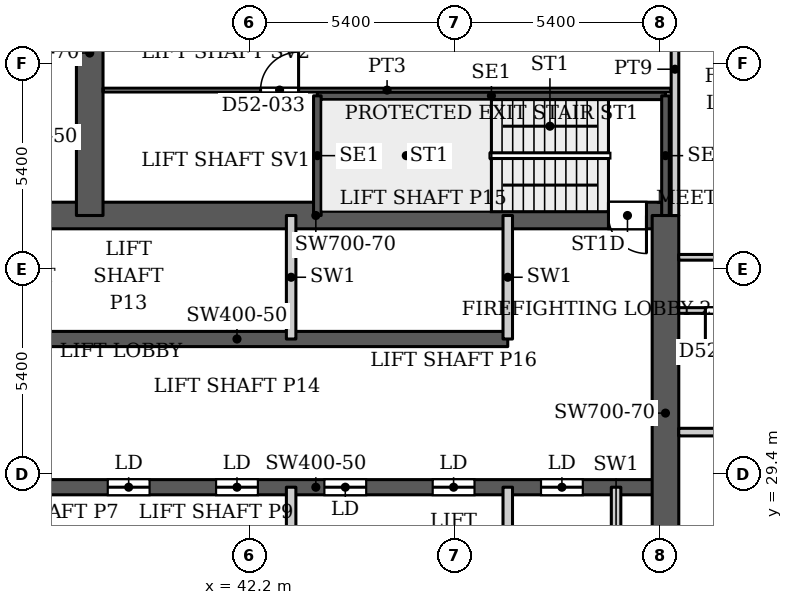
"""IFC4 building model, lengths in metres.
Left out: names, types, materials, properties, quantities, classifications, styles, units other than length and angle.
Written with IfcOpenShell. Run it as: python <this file> out.ifc"""

import sys

from ifc_helpers import new_model, si_unit, direction, frame, frame_2d, origin, place, context, subcontext, project, spatial, rectangle, extrude, source, transform, mapped, element, fill, save


model = new_model("IFC4")
c1 = context("Model", 3, precision=1e-05, world=origin(), true_north=direction((0.0, 1.0)))
c2 = subcontext(c1, "Body", "Model", "MODEL_VIEW")
j1 = project(units=[si_unit("LENGTHUNIT", "METRE"), si_unit("PLANEANGLEUNIT", "RADIAN")], contexts=[c1])
p1 = place(None, origin())
s1 = spatial("IfcSite", under=j1, at=p1, CompositionType="ELEMENT")
p2 = place(p1, origin())
s2 = spatial("IfcBuilding", under=s1, at=p2, CompositionType="ELEMENT")
p3 = place(p2, frame((0.0, 0.0, 224.0)))
s3 = spatial("IfcBuildingStorey", under=s2, at=p3, CompositionType="ELEMENT", Elevation=224.0)
p4 = place(p3, frame((34.75, 29.05, 0.0), z_axis=(0.0, 0.0, 1.0), x_axis=(1.0, 0.0, 0.0)))
e1 = element("IfcWall", 1, at=p4, inside=s3, PredefinedType="SHEAR", context=c2, shape_type="SweptSolid", body=[
    extrude(rectangle(XDim=18.4, YDim=0.4, at=frame_2d((9.2, 0.0))), origin(), (0.0, 0.0, 1.0), 3.9),
])
p5 = place(p4, frame((0.875, 0.0, 0.0)))
e2 = element("IfcOpeningElement", 2, at=p5, cuts=e1, PredefinedType="OPENING", context=c2, shape_type="SweptSolid", body=[
    extrude(rectangle(XDim=1.1, YDim=2.2, at=frame_2d((0.55, 1.1))), frame((0.0, 0.21, 0.0), z_axis=(0.0, -1.0, 0.0), x_axis=(1.0, 0.0, 0.0)), (0.0, 0.0, 1.0), 0.42),
])
p6 = place(p4, frame((3.725, 0.0, 0.0)))
e3 = element("IfcOpeningElement", 3, at=p6, cuts=e1, PredefinedType="OPENING", context=c2, shape_type="SweptSolid", body=[
    extrude(rectangle(XDim=1.1, YDim=2.2, at=frame_2d((0.55, 1.1))), frame((0.0, 0.21, 0.0), z_axis=(0.0, -1.0, 0.0), x_axis=(1.0, 0.0, 0.0)), (0.0, 0.0, 1.0), 0.42),
])
p7 = place(p4, frame((6.575, 0.0, 0.0)))
e4 = element("IfcOpeningElement", 4, at=p7, cuts=e1, PredefinedType="OPENING", context=c2, shape_type="SweptSolid", body=[
    extrude(rectangle(XDim=1.1, YDim=2.2, at=frame_2d((0.55, 1.1))), frame((0.0, 0.21, 0.0), z_axis=(0.0, -1.0, 0.0), x_axis=(1.0, 0.0, 0.0)), (0.0, 0.0, 1.0), 0.42),
])
p8 = place(p4, frame((9.425, 0.0, 0.0)))
e5 = element("IfcOpeningElement", 5, at=p8, cuts=e1, PredefinedType="OPENING", context=c2, shape_type="SweptSolid", body=[
    extrude(rectangle(XDim=1.1, YDim=2.2, at=frame_2d((0.55, 1.1))), frame((0.0, 0.21, 0.0), z_axis=(0.0, -1.0, 0.0), x_axis=(1.0, 0.0, 0.0)), (0.0, 0.0, 1.0), 0.42),
])
p9 = place(p4, frame((12.275, 0.0, 0.0)))
e6 = element("IfcOpeningElement", 6, at=p9, cuts=e1, PredefinedType="OPENING", context=c2, shape_type="SweptSolid", body=[
    extrude(rectangle(XDim=1.1, YDim=2.2, at=frame_2d((0.55, 1.1))), frame((0.0, 0.21, 0.0), z_axis=(0.0, -1.0, 0.0), x_axis=(1.0, 0.0, 0.0)), (0.0, 0.0, 1.0), 0.42),
])
p10 = place(p4, frame((15.125, 0.0, 0.0)))
e7 = element("IfcOpeningElement", 7, at=p10, cuts=e1, PredefinedType="OPENING", context=c2, shape_type="SweptSolid", body=[
    extrude(rectangle(XDim=1.1, YDim=2.2, at=frame_2d((0.55, 1.1))), frame((0.0, 0.21, 0.0), z_axis=(0.0, -1.0, 0.0), x_axis=(1.0, 0.0, 0.0)), (0.0, 0.0, 1.0), 0.42),
])
p11 = place(p3, frame((34.75, 32.95, 0.0), z_axis=(0.0, 0.0, 1.0), x_axis=(1.0, 0.0, 0.0)))
e8 = element("IfcWall", 8, at=p11, inside=s3, PredefinedType="SHEAR", context=c2, shape_type="SweptSolid", body=[
    extrude(rectangle(XDim=14.25, YDim=0.4, at=frame_2d((7.125, 0.0))), origin(), (0.0, 0.0, 1.0), 3.9),
])
p12 = place(p3, frame((34.75, 36.2, 0.0), z_axis=(0.0, 0.0, 1.0), x_axis=(1.0, 0.0, 0.0)))
e9 = element("IfcWall", 9, at=p12, inside=s3, PredefinedType="SHEAR", context=c2, shape_type="SweptSolid", body=[
    extrude(rectangle(XDim=18.4, YDim=0.7, at=frame_2d((9.2, 0.0))), origin(), (0.0, 0.0, 1.0), 3.9),
])
p13 = place(p12, frame((16.9, 0.0, 0.0)))
e10 = element("IfcOpeningElement", 10, at=p13, cuts=e9, PredefinedType="OPENING", context=c2, shape_type="SweptSolid", body=[
    extrude(rectangle(XDim=1.0, YDim=2.2, at=frame_2d((0.5, 1.1))), frame((0.0, 0.36, 0.0), z_axis=(0.0, -1.0, 0.0), x_axis=(1.0, 0.0, 0.0)), (0.0, 0.0, 1.0), 0.72),
])
p14 = place(p3, frame((38.0, 36.2, 0.0), z_axis=(0.0, 0.0, 1.0), x_axis=(0.0, 1.0, 0.0)))
e11 = element("IfcWall", 11, at=p14, inside=s3, PredefinedType="SHEAR", context=c2, shape_type="SweptSolid", body=[
    extrude(rectangle(XDim=8.55, YDim=0.7, at=frame_2d((4.275, 0.0))), origin(), (0.0, 0.0, 1.0), 3.9),
])
p15 = place(p3, frame((53.15, 25.8, 0.0), z_axis=(0.0, 0.0, 1.0), x_axis=(0.0, 1.0, 0.0)))
e12 = element("IfcWall", 12, at=p15, inside=s3, PredefinedType="SHEAR", context=c2, shape_type="SweptSolid", body=[
    extrude(rectangle(XDim=10.4, YDim=0.7, at=frame_2d((5.2, 0.0))), origin(), (0.0, 0.0, 1.0), 3.9),
])
p16 = place(p3, frame((43.99, 39.35, 0.0), z_axis=(0.0, 0.0, 1.0), x_axis=(1.0, 0.0, 0.0)))
e13 = element("IfcWall", 13, at=p16, inside=s3, PredefinedType="SHEAR", context=c2, shape_type="SweptSolid", body=[
    extrude(rectangle(XDim=9.16, YDim=0.2, at=frame_2d((4.58, 0.0))), origin(), (0.0, 0.0, 1.0), 3.9),
])
for number, where, z_axis, x_axis in (
    (14, (43.99, 36.2, 0.0), (0.0, 0.0, 1.0), (0.0, 1.0, 0.0)),
    (15, (53.15, 36.2, 0.0), (0.0, 0.0, 1.0), (0.0, 1.0, 0.0)),
):
    element("IfcWall", number, at=place(p3, frame(where, z_axis=z_axis, x_axis=x_axis)), inside=s3, PredefinedType="SHEAR", context=c2, shape_type="SweptSolid", body=[
        extrude(rectangle(XDim=3.15, YDim=0.2, at=frame_2d((1.575, 0.0))), origin(), (0.0, 0.0, 1.0), 3.9),
    ])
for number, where, z_axis, x_axis in (
    (16, (43.3, 25.8, 0.0), (0.0, 0.0, 1.0), (0.0, 1.0, 0.0)),
    (17, (43.3, 32.95, 0.0), (0.0, 0.0, 1.0), (0.0, 1.0, 0.0)),
    (18, (49.0, 25.8, 0.0), (0.0, 0.0, 1.0), (0.0, 1.0, 0.0)),
    (19, (49.0, 32.95, 0.0), (0.0, 0.0, 1.0), (0.0, 1.0, 0.0)),
    (20, (51.85, 25.8, 0.0), (0.0, 0.0, 1.0), (0.0, 1.0, 0.0)),
):
    element("IfcWall", number, at=place(p3, frame(where, z_axis=z_axis, x_axis=x_axis)), inside=s3, PredefinedType="PARTITIONING", context=c2, shape_type="SweptSolid", body=[
        extrude(rectangle(XDim=3.25, YDim=0.25, at=frame_2d((1.625, 0.0))), origin(), (0.0, 0.0, 1.0), 3.9),
    ])
p17 = place(p3, frame((38.349, 39.5, 0.0), z_axis=(0.0, 0.0, 1.0), x_axis=(1.0, 0.0, 0.0)))
e21 = element("IfcWall", 21, at=p17, inside=s3, PredefinedType="PARTITIONING", context=c2, shape_type="SweptSolid", body=[
    extrude(rectangle(XDim=14.951, YDim=0.1, at=frame_2d((7.476, 0.0))), origin(), (0.0, 0.0, 1.0), 3.6),
])
p18 = place(p17, frame((4.147, 0.0, 0.0)))
e22 = element("IfcOpeningElement", 22, at=p18, cuts=e21, PredefinedType="OPENING", context=c2, shape_type="SweptSolid", body=[
    extrude(rectangle(XDim=1.0, YDim=2.1, at=frame_2d((0.5, 1.05))), frame((0.0, 0.06, 0.0), z_axis=(0.0, -1.0, 0.0), x_axis=(1.0, 0.0, 0.0)), (0.0, 0.0, 1.0), 0.12),
])
p19 = place(p3, frame((53.4, 36.199, 0.0), z_axis=(0.0, 0.0, 1.0), x_axis=(0.0, 1.0, 0.0)))
e23 = element("IfcWall", 23, at=p19, inside=s3, PredefinedType="PARTITIONING", context=c2, shape_type="SweptSolid", body=[
    extrude(rectangle(XDim=7.701, YDim=0.2, at=frame_2d((3.851, 0.0))), origin(), (0.0, 0.0, 1.0), 3.6),
])
p20 = place(p3, frame((53.499, 30.5, 0.0), z_axis=(0.0, 0.0, 1.0), x_axis=(1.0, 0.0, 0.0)))
e24 = element("IfcWall", 24, at=p20, inside=s3, PredefinedType="PARTITIONING", context=c2, shape_type="SweptSolid", body=[
    extrude(rectangle(XDim=28.401, YDim=0.2, at=frame_2d((14.2, 0.0))), origin(), (0.0, 0.0, 1.0), 3.6),
])
p21 = place(p20, frame((17.701, 0.0, 0.0)))
e25 = element("IfcOpeningElement", 25, at=p21, cuts=e24, PredefinedType="OPENING", context=c2, shape_type="SweptSolid", body=[
    extrude(rectangle(XDim=1.0, YDim=2.1, at=frame_2d((0.5, 1.05))), frame((0.0, 0.11, 0.0), z_axis=(0.0, -1.0, 0.0), x_axis=(1.0, 0.0, 0.0)), (0.0, 0.0, 1.0), 0.22),
])
p22 = place(p20, frame((24.301, 0.0, 0.0)))
e26 = element("IfcOpeningElement", 26, at=p22, cuts=e24, PredefinedType="OPENING", context=c2, shape_type="SweptSolid", body=[
    extrude(rectangle(XDim=1.0, YDim=2.1, at=frame_2d((0.5, 1.05))), frame((0.0, 0.11, 0.0), z_axis=(0.0, -1.0, 0.0), x_axis=(1.0, 0.0, 0.0)), (0.0, 0.0, 1.0), 0.22),
])
p23 = place(p3, frame((53.499, 33.7, 0.0), z_axis=(0.0, 0.0, 1.0), x_axis=(1.0, 0.0, 0.0)))
e27 = element("IfcWall", 27, at=p23, inside=s3, PredefinedType="PARTITIONING", context=c2, shape_type="SweptSolid", body=[
    extrude(rectangle(XDim=17.076, YDim=0.15, at=frame_2d((8.538, 0.0))), origin(), (0.0, 0.0, 1.0), 3.6),
])
p24 = place(p23, frame((10.151, 0.0, 0.0)))
e28 = element("IfcOpeningElement", 28, at=p24, cuts=e27, PredefinedType="OPENING", context=c2, shape_type="SweptSolid", body=[
    extrude(rectangle(XDim=0.8, YDim=2.1, at=frame_2d((0.4, 1.05))), frame((0.0, 0.085, 0.0), z_axis=(0.0, -1.0, 0.0), x_axis=(1.0, 0.0, 0.0)), (0.0, 0.0, 1.0), 0.17),
])
p25 = place(p23, frame((14.651, 0.0, 0.0)))
e29 = element("IfcOpeningElement", 29, at=p25, cuts=e27, PredefinedType="OPENING", context=c2, shape_type="SweptSolid", body=[
    extrude(rectangle(XDim=0.8, YDim=2.1, at=frame_2d((0.4, 1.05))), frame((0.0, 0.085, 0.0), z_axis=(0.0, -1.0, 0.0), x_axis=(1.0, 0.0, 0.0)), (0.0, 0.0, 1.0), 0.17),
])
p26 = place(p23, frame((7.451, 0.0, 0.0)))
e30 = element("IfcOpeningElement", 30, at=p26, cuts=e27, PredefinedType="OPENING", context=c2, shape_type="SweptSolid", body=[
    extrude(rectangle(XDim=0.8, YDim=2.1, at=frame_2d((0.4, 1.05))), frame((0.0, 0.085, 0.0), z_axis=(0.0, -1.0, 0.0), x_axis=(1.0, 0.0, 0.0)), (0.0, 0.0, 1.0), 0.17),
])
p27 = place(p23, frame((3.851, 0.0, 0.0)))
e31 = element("IfcOpeningElement", 31, at=p27, cuts=e27, PredefinedType="OPENING", context=c2, shape_type="SweptSolid", body=[
    extrude(rectangle(XDim=0.9, YDim=2.1, at=frame_2d((0.45, 1.05))), frame((0.0, 0.085, 0.0), z_axis=(0.0, -1.0, 0.0), x_axis=(1.0, 0.0, 0.0)), (0.0, 0.0, 1.0), 0.17),
])
p28 = place(p23, frame((0.701, 0.0, 0.0)))
e32 = element("IfcOpeningElement", 32, at=p28, cuts=e27, PredefinedType="OPENING", context=c2, shape_type="SweptSolid", body=[
    extrude(rectangle(XDim=0.8, YDim=2.1, at=frame_2d((0.4, 1.05))), frame((0.0, 0.085, 0.0), z_axis=(0.0, -1.0, 0.0), x_axis=(1.0, 0.0, 0.0)), (0.0, 0.0, 1.0), 0.17),
])
p29 = place(p23, frame((12.701, 0.0, 0.0)))
e33 = element("IfcOpeningElement", 33, at=p29, cuts=e27, PredefinedType="OPENING", context=c2, shape_type="SweptSolid", body=[
    extrude(rectangle(XDim=0.8, YDim=2.1, at=frame_2d((0.4, 1.05))), frame((0.0, 0.085, 0.0), z_axis=(0.0, -1.0, 0.0), x_axis=(1.0, 0.0, 0.0)), (0.0, 0.0, 1.0), 0.17),
])
p30 = place(p3, frame((53.499, 35.1, 0.0), z_axis=(0.0, 0.0, 1.0), x_axis=(1.0, 0.0, 0.0)))
e34 = element("IfcWall", 34, at=p30, inside=s3, PredefinedType="PARTITIONING", context=c2, shape_type="SweptSolid", body=[
    extrude(rectangle(XDim=19.901, YDim=0.15, at=frame_2d((9.95, 0.0))), origin(), (0.0, 0.0, 1.0), 3.6),
])
p31 = place(p30, frame((8.451, 0.0, 0.0)))
e35 = element("IfcOpeningElement", 35, at=p31, cuts=e34, PredefinedType="OPENING", context=c2, shape_type="SweptSolid", body=[
    extrude(rectangle(XDim=0.9, YDim=2.1, at=frame_2d((0.45, 1.05))), frame((0.0, 0.085, 0.0), z_axis=(0.0, -1.0, 0.0), x_axis=(1.0, 0.0, 0.0)), (0.0, 0.0, 1.0), 0.17),
])
p32 = place(p30, frame((11.601, 0.0, 0.0)))
e36 = element("IfcOpeningElement", 36, at=p32, cuts=e34, PredefinedType="OPENING", context=c2, shape_type="SweptSolid", body=[
    extrude(rectangle(XDim=0.9, YDim=2.1, at=frame_2d((0.45, 1.05))), frame((0.0, 0.085, 0.0), z_axis=(0.0, -1.0, 0.0), x_axis=(1.0, 0.0, 0.0)), (0.0, 0.0, 1.0), 0.17),
])
p33 = place(p30, frame((1.701, 0.0, 0.0)))
e37 = element("IfcOpeningElement", 37, at=p33, cuts=e34, PredefinedType="OPENING", context=c2, shape_type="SweptSolid", body=[
    extrude(rectangle(XDim=1.0, YDim=2.1, at=frame_2d((0.5, 1.05))), frame((0.0, 0.085, 0.0), z_axis=(0.0, -1.0, 0.0), x_axis=(1.0, 0.0, 0.0)), (0.0, 0.0, 1.0), 0.17),
])
p34 = place(p30, frame((4.801, 0.0, 0.0)))
e38 = element("IfcOpeningElement", 38, at=p34, cuts=e34, PredefinedType="OPENING", context=c2, shape_type="SweptSolid", body=[
    extrude(rectangle(XDim=1.6, YDim=2.1, at=frame_2d((0.8, 1.05))), frame((0.0, 0.085, 0.0), z_axis=(0.0, -1.0, 0.0), x_axis=(1.0, 0.0, 0.0)), (0.0, 0.0, 1.0), 0.17),
])
p35 = place(p30, frame((15.701, 0.0, 0.0)))
e39 = element("IfcOpeningElement", 39, at=p35, cuts=e34, PredefinedType="OPENING", context=c2, shape_type="SweptSolid", body=[
    extrude(rectangle(XDim=0.9, YDim=2.1, at=frame_2d((0.45, 1.05))), frame((0.0, 0.085, 0.0), z_axis=(0.0, -1.0, 0.0), x_axis=(1.0, 0.0, 0.0)), (0.0, 0.0, 1.0), 0.17),
])
m1 = source(origin(), c2, "Body", "SweptSolid", [
    extrude(rectangle(XDim=1.1, YDim=2.2, at=frame_2d((0.55, 1.1))), frame((0.0, 0.025, 0.0), z_axis=(0.0, -1.0, 0.0), x_axis=(1.0, 0.0, 0.0)), (0.0, 0.0, 1.0), 0.05),
])
p36 = place(p6, origin())
e40 = element("IfcDoor", 40, at=p36, inside=s3, OperationType="SLIDING_TO_LEFT", PredefinedType="DOOR", context=c2, shape_type="MappedRepresentation", body=[
    mapped(m1, transform((0.0, 0.0, 0.0), x_axis=(1.0, 0.0, 0.0), y_axis=(0.0, 1.0, 0.0), z_axis=(0.0, 0.0, 1.0), scale=1.0)),
])
fill(e3, e40)
p37 = place(p7, origin())
e41 = element("IfcDoor", 41, at=p37, inside=s3, OperationType="SLIDING_TO_LEFT", PredefinedType="DOOR", context=c2, shape_type="MappedRepresentation", body=[
    mapped(m1, transform((0.0, 0.0, 0.0), x_axis=(1.0, 0.0, 0.0), y_axis=(0.0, 1.0, 0.0), z_axis=(0.0, 0.0, 1.0), scale=1.0)),
])
fill(e4, e41)
p38 = place(p8, origin())
e42 = element("IfcDoor", 42, at=p38, inside=s3, OperationType="SLIDING_TO_LEFT", PredefinedType="DOOR", context=c2, shape_type="MappedRepresentation", body=[
    mapped(m1, transform((0.0, 0.0, 0.0), x_axis=(1.0, 0.0, 0.0), y_axis=(0.0, 1.0, 0.0), z_axis=(0.0, 0.0, 1.0), scale=1.0)),
])
fill(e5, e42)
p39 = place(p9, origin())
e43 = element("IfcDoor", 43, at=p39, inside=s3, OperationType="SLIDING_TO_LEFT", PredefinedType="DOOR", context=c2, shape_type="MappedRepresentation", body=[
    mapped(m1, transform((0.0, 0.0, 0.0), x_axis=(1.0, 0.0, 0.0), y_axis=(0.0, 1.0, 0.0), z_axis=(0.0, 0.0, 1.0), scale=1.0)),
])
fill(e6, e43)
p40 = place(p10, origin())
e44 = element("IfcDoor", 44, at=p40, inside=s3, OperationType="SLIDING_TO_LEFT", PredefinedType="DOOR", context=c2, shape_type="MappedRepresentation", body=[
    mapped(m1, transform((0.0, 0.0, 0.0), x_axis=(1.0, 0.0, 0.0), y_axis=(0.0, 1.0, 0.0), z_axis=(0.0, 0.0, 1.0), scale=1.0)),
])
fill(e7, e44)
m2 = source(origin(), c2, "Body", "SweptSolid", [
    extrude(rectangle(XDim=1.0, YDim=2.2, at=frame_2d((0.5, 1.1))), frame((0.0, 0.025, 0.0), z_axis=(0.0, -1.0, 0.0), x_axis=(1.0, 0.0, 0.0)), (0.0, 0.0, 1.0), 0.05),
])
p41 = place(p13, origin())
e45 = element("IfcDoor", 45, at=p41, inside=s3, OperationType="SINGLE_SWING_RIGHT", PredefinedType="DOOR", context=c2, shape_type="MappedRepresentation", body=[
    mapped(m2, transform((0.0, 0.0, 0.0), x_axis=(1.0, 0.0, 0.0), y_axis=(0.0, 1.0, 0.0), z_axis=(0.0, 0.0, 1.0), scale=1.0)),
])
fill(e10, e45)
m3 = source(origin(), c2, "Body", "SweptSolid", [
    extrude(rectangle(XDim=0.8, YDim=2.1, at=frame_2d((0.4, 1.05))), frame((0.0, 0.025, 0.0), z_axis=(0.0, -1.0, 0.0), x_axis=(1.0, 0.0, 0.0)), (0.0, 0.0, 1.0), 0.05),
])
p42 = place(p28, origin())
e46 = element("IfcDoor", 46, at=p42, inside=s3, OperationType="SINGLE_SWING_RIGHT", PredefinedType="DOOR", context=c2, shape_type="MappedRepresentation", body=[
    mapped(m3, transform((0.0, 0.0, 0.0), x_axis=(1.0, 0.0, 0.0), y_axis=(0.0, 1.0, 0.0), z_axis=(0.0, 0.0, 1.0), scale=1.0)),
])
fill(e32, e46)
m4 = source(origin(), c2, "Body", "SweptSolid", [
    extrude(rectangle(XDim=1.0, YDim=2.1, at=frame_2d((0.5, 1.05))), frame((0.0, 0.025, 0.0), z_axis=(0.0, -1.0, 0.0), x_axis=(1.0, 0.0, 0.0)), (0.0, 0.0, 1.0), 0.05),
])
p43 = place(p18, origin())
e47 = element("IfcDoor", 47, at=p43, inside=s3, OperationType="SINGLE_SWING_LEFT", PredefinedType="DOOR", context=c2, shape_type="MappedRepresentation", body=[
    mapped(m4, transform((0.0, 0.0, 0.0), x_axis=(1.0, 0.0, 0.0), y_axis=(0.0, 1.0, 0.0), z_axis=(0.0, 0.0, 1.0), scale=1.0)),
])
fill(e22, e47)
save(model, sys.argv[1])
